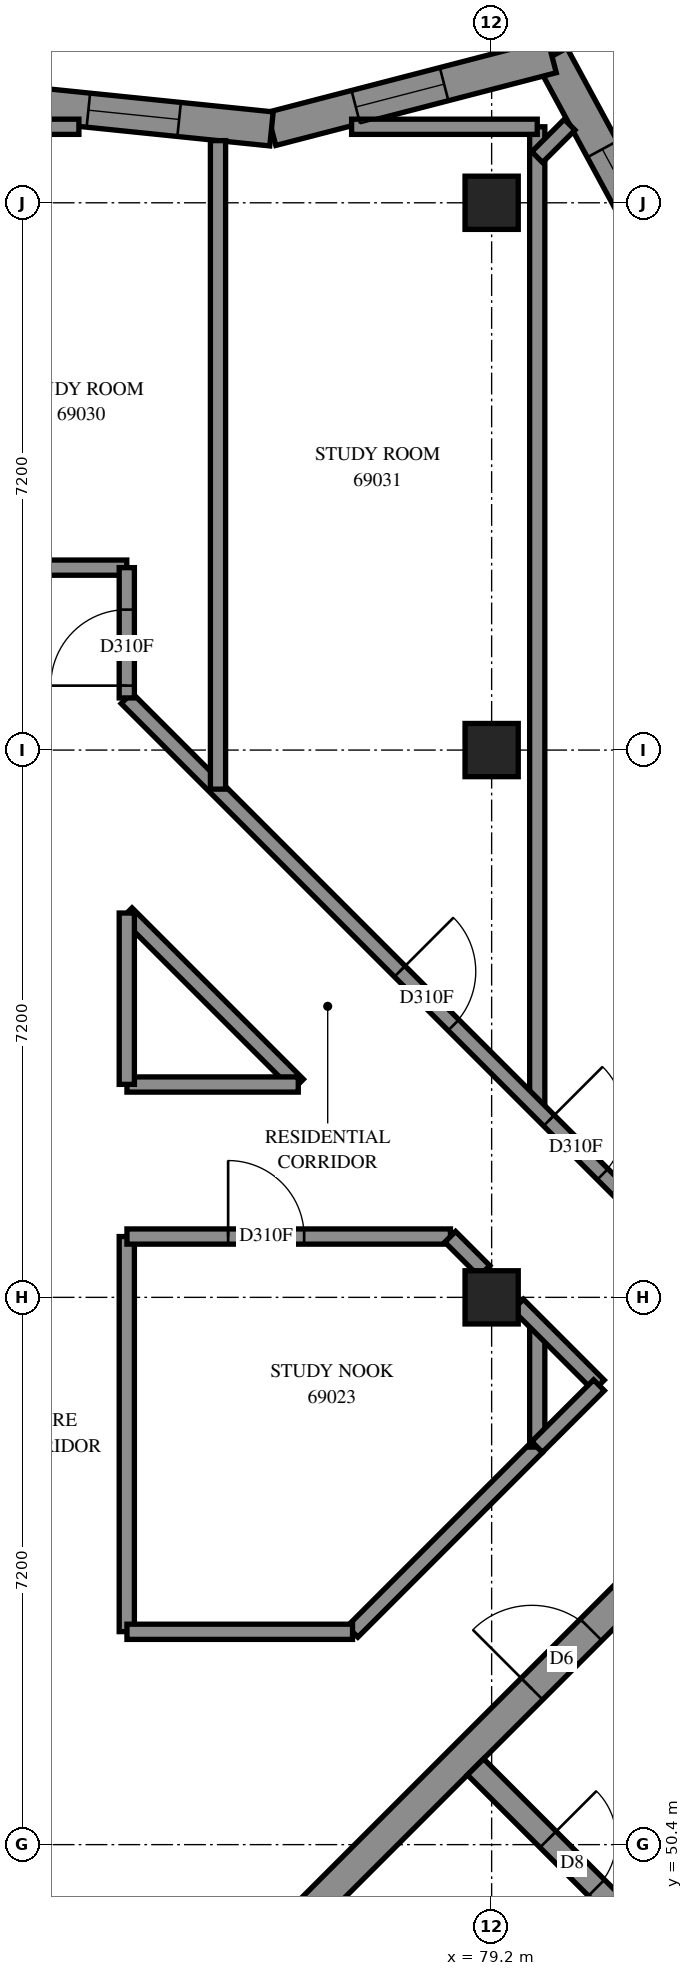
"""IFC4 building model, lengths in metres.
Left out: names, types, materials, properties, quantities, classifications, styles, units other than length and angle.
Written with IfcOpenShell. Run it as: python <this file> out.ifc"""

import sys

from ifc_helpers import new_model, si_unit, direction, frame, frame_2d, origin, origin_2d, place, context, subcontext, project, spatial, polyline, rectangle, outline, extrude, element, fill, save


model = new_model("IFC4")
c1 = context("Model", 3, precision=1e-05, world=origin(), true_north=direction((0.0, 1.0)))
c2 = subcontext(c1, "Body", "Model", "MODEL_VIEW")
j1 = project(units=[si_unit("LENGTHUNIT", "METRE"), si_unit("PLANEANGLEUNIT", "RADIAN")], contexts=[c1])
p1 = place(None, origin())
s1 = spatial("IfcSite", under=j1, at=p1, CompositionType="ELEMENT")
p2 = place(p1, origin())
s2 = spatial("IfcBuilding", under=s1, at=p2, CompositionType="ELEMENT")
p3 = place(p2, frame((0.0, 0.0, 254.0)))
s3 = spatial("IfcBuildingStorey", under=s2, at=p3, CompositionType="ELEMENT", Elevation=254.0)
for number, where, z_axis, x_axis in (
    (1, (79.2, 57.6, 0.0), (0.0, 0.0, 1.0), (1.0, 0.0, 0.0)),
    (2, (79.2, 64.8, 0.0), (0.0, 0.0, 1.0), (1.0, 0.0, 0.0)),
    (3, (79.2, 72.0, 0.0), (0.0, 0.0, 1.0), (1.0, 0.0, 0.0)),
):
    element("IfcColumn", number, at=place(p3, frame(where, z_axis=z_axis, x_axis=x_axis)), inside=s3, PredefinedType="COLUMN", context=c2, shape_type="SweptSolid", body=[
        extrude(rectangle(XDim=0.7, YDim=0.7, at=origin_2d()), origin(), (0.0, 0.0, 1.0), 3.1),
    ])
p4 = place(p3, frame((76.513, 49.231, -0.3), z_axis=(0.0, 0.0, 1.0), x_axis=(0.7071067812, 0.7071067812, 0.0)))
e4 = element("IfcWall", 4, at=p4, inside=s3, PredefinedType="SHEAR", context=c2, shape_type="SweptSolid", body=[
    extrude(rectangle(XDim=14.4, YDim=0.4, at=frame_2d((7.2, 0.0))), origin(), (0.0, 0.0, 1.0), 2.7),
])
p5 = place(p4, frame((4.55, 0.0, 0.3)))
e5 = element("IfcOpeningElement", 5, at=p5, cuts=e4, PredefinedType="OPENING", context=c2, shape_type="SweptSolid", body=[
    extrude(rectangle(XDim=1.1, YDim=2.1, at=frame_2d((0.55, 1.05))), frame((0.0, 0.21, 0.0), z_axis=(0.0, -1.0, 0.0), x_axis=(1.0, 0.0, 0.0)), (0.0, 0.0, 1.0), 0.42),
])
p6 = place(p4, frame((11.35, 0.0, 0.3)))
e6 = element("IfcOpeningElement", 6, at=p6, cuts=e4, PredefinedType="OPENING", context=c2, shape_type="SweptSolid", body=[
    extrude(rectangle(XDim=1.1, YDim=2.1, at=frame_2d((0.55, 1.05))), frame((0.0, 0.21, 0.0), z_axis=(0.0, -1.0, 0.0), x_axis=(1.0, 0.0, 0.0)), (0.0, 0.0, 1.0), 0.42),
])
p7 = place(p3, frame((78.988, 51.423, 0.0), z_axis=(0.0, 0.0, 1.0), x_axis=(0.7071067812, -0.7071067812, 0.0)))
e7 = element("IfcWall", 7, at=p7, inside=s3, PredefinedType="SOLIDWALL", context=c2, shape_type="SweptSolid", body=[
    extrude(rectangle(XDim=14.4, YDim=0.3, at=frame_2d((7.2, 0.0))), origin(), (0.0, 0.0, 1.0), 3.1),
])
p8 = place(p7, frame((1.35, 0.0, 0.0)))
e8 = element("IfcOpeningElement", 8, at=p8, cuts=e7, PredefinedType="OPENING", context=c2, shape_type="SweptSolid", body=[
    extrude(rectangle(XDim=0.9, YDim=2.1, at=frame_2d((0.45, 1.05))), frame((0.0, 0.16, 0.0), z_axis=(0.0, -1.0, 0.0), x_axis=(1.0, 0.0, 0.0)), (0.0, 0.0, 1.0), 0.32),
])
p9 = place(p7, frame((4.95, 0.0, 0.0)))
e9 = element("IfcOpeningElement", 9, at=p9, cuts=e7, PredefinedType="OPENING", context=c2, shape_type="SweptSolid", body=[
    extrude(rectangle(XDim=0.9, YDim=2.1, at=frame_2d((0.45, 1.05))), frame((0.0, 0.16, 0.0), z_axis=(0.0, -1.0, 0.0), x_axis=(1.0, 0.0, 0.0)), (0.0, 0.0, 1.0), 0.32),
])
p10 = place(p7, frame((8.55, 0.0, 0.0)))
e10 = element("IfcOpeningElement", 10, at=p10, cuts=e7, PredefinedType="OPENING", context=c2, shape_type="SweptSolid", body=[
    extrude(rectangle(XDim=0.9, YDim=2.1, at=frame_2d((0.45, 1.05))), frame((0.0, 0.16, 0.0), z_axis=(0.0, -1.0, 0.0), x_axis=(1.0, 0.0, 0.0)), (0.0, 0.0, 1.0), 0.32),
])
p11 = place(p7, frame((12.05, 0.0, 0.0)))
e11 = element("IfcOpeningElement", 11, at=p11, cuts=e7, PredefinedType="OPENING", context=c2, shape_type="SweptSolid", body=[
    extrude(rectangle(XDim=1.1, YDim=2.1, at=frame_2d((0.55, 1.05))), frame((0.0, 0.16, 0.0), z_axis=(0.0, -1.0, 0.0), x_axis=(1.0, 0.0, 0.0)), (0.0, 0.0, 1.0), 0.32),
])
p12 = place(p3, frame((81.586, 70.987, 0.0), z_axis=(0.0, 0.0, 1.0), x_axis=(-0.4760809047, 0.8794014852, 0.0)))
e12 = element("IfcWall", 12, at=p12, inside=s3, PredefinedType="SOLIDWALL", context=c2, shape_type="SweptSolid", body=[
    extrude(outline(polyline([(0.046, -0.225), (3.521, -0.225), (3.169, 0.225), (-0.046, 0.225), (0.046, -0.225)])), origin(), (0.0, 0.0, 1.0), 3.1),
])
p13 = place(p12, frame((0.754, 0.0, 0.45)))
e13 = element("IfcOpeningElement", 13, at=p13, cuts=e12, PredefinedType="OPENING", context=c2, shape_type="SweptSolid", body=[
    extrude(rectangle(XDim=1.2, YDim=2.55, at=frame_2d((0.6, 1.275))), frame((0.0, 0.235, 0.0), z_axis=(0.0, -1.0, 0.0), x_axis=(1.0, 0.0, 0.0)), (0.0, 0.0, 1.0), 0.47),
])
p14 = place(p3, frame((79.994, 73.929, 0.0), z_axis=(0.0, 0.0, 1.0), x_axis=(-0.9679820268, -0.2510195126, 0.0)))
e14 = element("IfcWall", 14, at=p14, inside=s3, PredefinedType="SOLIDWALL", context=c2, shape_type="SweptSolid", body=[
    extrude(outline(polyline([(-0.176, -0.225), (3.772, -0.225), (3.853, 0.225), (0.176, 0.225), (-0.176, -0.225)])), origin(), (0.0, 0.0, 1.0), 3.1),
])
p15 = place(p14, frame((1.466, 0.0, 0.45)))
e15 = element("IfcOpeningElement", 15, at=p15, cuts=e14, PredefinedType="OPENING", context=c2, shape_type="SweptSolid", body=[
    extrude(rectangle(XDim=1.2, YDim=2.55, at=frame_2d((0.6, 1.275))), frame((0.0, 0.235, 0.0), z_axis=(0.0, -1.0, 0.0), x_axis=(1.0, 0.0, 0.0)), (0.0, 0.0, 1.0), 0.47),
])
p16 = place(p3, frame((76.304, 72.972, 0.0), z_axis=(0.0, 0.0, 1.0), x_axis=(-0.994808045, 0.1017691196, 0.0)))
e16 = element("IfcWall", 16, at=p16, inside=s3, PredefinedType="SOLIDWALL", context=c2, shape_type="SweptSolid", body=[
    extrude(outline(polyline([(0.04, -0.225), (3.882, -0.225), (3.836, 0.225), (-0.04, 0.225), (0.04, -0.225)])), origin(), (0.0, 0.0, 1.0), 3.1),
])
p17 = place(p16, frame((1.222, 0.0, 0.45)))
e17 = element("IfcOpeningElement", 17, at=p17, cuts=e16, PredefinedType="OPENING", context=c2, shape_type="SweptSolid", body=[
    extrude(rectangle(XDim=1.2, YDim=2.55, at=frame_2d((0.6, 1.275))), frame((0.0, 0.235, 0.0), z_axis=(0.0, -1.0, 0.0), x_axis=(1.0, 0.0, 0.0)), (0.0, 0.0, 1.0), 0.47),
])
p18 = place(p3, frame((55.2, 67.2, 0.0), z_axis=(0.0, 0.0, 1.0), x_axis=(1.0, 0.0, 0.0)))
e18 = element("IfcWall", 18, at=p18, inside=s3, PredefinedType="PARTITIONING", context=c2, shape_type="SweptSolid", body=[
    extrude(rectangle(XDim=19.2, YDim=0.2, at=frame_2d((9.6, 0.0))), origin(), (0.0, 0.0, 1.0), 3.1),
])
p19 = place(p18, frame((4.475, 0.0, 0.0)))
e19 = element("IfcOpeningElement", 19, at=p19, cuts=e18, PredefinedType="OPENING", context=c2, shape_type="SweptSolid", body=[
    extrude(rectangle(XDim=1.0, YDim=2.1, at=frame_2d((0.5, 1.05))), frame((0.0, 0.11, 0.0), z_axis=(0.0, -1.0, 0.0), x_axis=(1.0, 0.0, 0.0)), (0.0, 0.0, 1.0), 0.22),
])
p20 = place(p18, frame((8.301, 0.0, 0.0)))
e20 = element("IfcOpeningElement", 20, at=p20, cuts=e18, PredefinedType="OPENING", context=c2, shape_type="SweptSolid", body=[
    extrude(rectangle(XDim=0.9, YDim=2.1, at=frame_2d((0.45, 1.05))), frame((0.0, 0.11, 0.0), z_axis=(0.0, -1.0, 0.0), x_axis=(1.0, 0.0, 0.0)), (0.0, 0.0, 1.0), 0.22),
])
p21 = place(p18, frame((13.88, 0.0, 0.0)))
e21 = element("IfcOpeningElement", 21, at=p21, cuts=e18, PredefinedType="OPENING", context=c2, shape_type="SweptSolid", body=[
    extrude(rectangle(XDim=1.0, YDim=2.1, at=frame_2d((0.5, 1.05))), frame((0.0, 0.11, 0.0), z_axis=(0.0, -1.0, 0.0), x_axis=(1.0, 0.0, 0.0)), (0.0, 0.0, 1.0), 0.22),
])
p22 = place(p3, frame((79.8, 60.086, 0.0), z_axis=(0.0, 0.0, 1.0), x_axis=(0.0, 1.0, 0.0)))
e22 = element("IfcWall", 22, at=p22, inside=s3, PredefinedType="PARTITIONING", context=c2, shape_type="SweptSolid", body=[
    extrude(rectangle(XDim=12.914, YDim=0.2, at=frame_2d((6.457, 0.0))), origin(), (0.0, 0.0, 1.0), 3.1),
])
p23 = place(p3, frame((74.397, 65.483, 0.0), z_axis=(0.0, 0.0, 1.0), x_axis=(0.7071067812, -0.7071067812, 0.0)))
e23 = element("IfcWall", 23, at=p23, inside=s3, PredefinedType="PARTITIONING", context=c2, shape_type="SweptSolid", body=[
    extrude(rectangle(XDim=10.788, YDim=0.2, at=frame_2d((5.394, 0.0))), origin(), (0.0, 0.0, 1.0), 3.1),
])
p24 = place(p23, frame((5.083, 0.0, 0.0)))
e24 = element("IfcOpeningElement", 24, at=p24, cuts=e23, PredefinedType="OPENING", context=c2, shape_type="SweptSolid", body=[
    extrude(rectangle(XDim=1.0, YDim=2.1, at=frame_2d((0.5, 1.05))), frame((0.0, 0.11, 0.0), z_axis=(0.0, -1.0, 0.0), x_axis=(1.0, 0.0, 0.0)), (0.0, 0.0, 1.0), 0.22),
])
p25 = place(p23, frame((7.858, 0.0, 0.0)))
e25 = element("IfcOpeningElement", 25, at=p25, cuts=e23, PredefinedType="OPENING", context=c2, shape_type="SweptSolid", body=[
    extrude(rectangle(XDim=1.0, YDim=2.1, at=frame_2d((0.5, 1.05))), frame((0.0, 0.11, 0.0), z_axis=(0.0, -1.0, 0.0), x_axis=(1.0, 0.0, 0.0)), (0.0, 0.0, 1.0), 0.22),
])
p26 = place(p3, frame((75.6, 64.286, 0.0), z_axis=(0.0, 0.0, 1.0), x_axis=(0.0, 1.0, 0.0)))
e26 = element("IfcWall", 26, at=p26, inside=s3, PredefinedType="PARTITIONING", context=c2, shape_type="SweptSolid", body=[
    extrude(rectangle(XDim=8.532, YDim=0.2, at=frame_2d((4.266, 0.0))), origin(), (0.0, 0.0, 1.0), 3.1),
])
p27 = place(p3, frame((74.4, 53.202, 0.0), z_axis=(0.0, 0.0, 1.0), x_axis=(0.0, 1.0, 0.0)))
e27 = element("IfcWall", 27, at=p27, inside=s3, PredefinedType="PARTITIONING", context=c2, shape_type="SweptSolid", body=[
    extrude(rectangle(XDim=5.198, YDim=0.2, at=frame_2d((2.599, 0.0))), origin(), (0.0, 0.0, 1.0), 3.1),
])
p28 = place(p3, frame((74.402, 58.4, 0.0), z_axis=(0.0, 0.0, 1.0), x_axis=(1.0, 0.0, 0.0)))
e28 = element("IfcWall", 28, at=p28, inside=s3, PredefinedType="PARTITIONING", context=c2, shape_type="SweptSolid", body=[
    extrude(rectangle(XDim=4.256, YDim=0.2, at=frame_2d((2.128, 0.0))), origin(), (0.0, 0.0, 1.0), 3.1),
])
p29 = place(p28, frame((1.331, 0.0, 0.0)))
e29 = element("IfcOpeningElement", 29, at=p29, cuts=e28, PredefinedType="OPENING", context=c2, shape_type="SweptSolid", body=[
    extrude(rectangle(XDim=1.0, YDim=2.1, at=frame_2d((0.5, 1.05))), frame((0.0, 0.11, 0.0), z_axis=(0.0, -1.0, 0.0), x_axis=(1.0, 0.0, 0.0)), (0.0, 0.0, 1.0), 0.22),
])
p30 = place(p3, frame((77.37, 53.2, 0.0), z_axis=(0.0, 0.0, 1.0), x_axis=(0.7071067812, 0.7071067812, 0.0)))
e30 = element("IfcWall", 30, at=p30, inside=s3, PredefinedType="PARTITIONING", context=c2, shape_type="SweptSolid", body=[
    extrude(rectangle(XDim=3.437, YDim=0.2, at=frame_2d((1.718, 0.0))), origin(), (0.0, 0.0, 1.0), 3.1),
])
p31 = place(p3, frame((74.399, 62.653, 0.0), z_axis=(0.0, 0.0, 1.0), x_axis=(0.7071067812, -0.7071067812, 0.0)))
e31 = element("IfcWall", 31, at=p31, inside=s3, PredefinedType="PARTITIONING", context=c2, shape_type="SweptSolid", body=[
    extrude(rectangle(XDim=3.188, YDim=0.2, at=frame_2d((1.594, 0.0))), origin(), (0.0, 0.0, 1.0), 3.1),
])
p32 = place(p3, frame((74.402, 53.2, 0.0), z_axis=(0.0, 0.0, 1.0), x_axis=(1.0, 0.0, 0.0)))
e32 = element("IfcWall", 32, at=p32, inside=s3, PredefinedType="PARTITIONING", context=c2, shape_type="SweptSolid", body=[
    extrude(rectangle(XDim=2.968, YDim=0.2, at=frame_2d((1.484, 0.0))), origin(), (0.0, 0.0, 1.0), 3.1),
])
p33 = place(p3, frame((71.16, 73.0, 0.0), z_axis=(0.0, 0.0, 1.0), x_axis=(1.0, 0.0, 0.0)))
e33 = element("IfcWall", 33, at=p33, inside=s3, PredefinedType="PARTITIONING", context=c2, shape_type="SweptSolid", body=[
    extrude(rectangle(XDim=2.61, YDim=0.2, at=frame_2d((1.305, 0.0))), origin(), (0.0, 0.0, 1.0), 3.1),
])
p34 = place(p3, frame((77.358, 73.0, 0.0), z_axis=(0.0, 0.0, 1.0), x_axis=(1.0, 0.0, 0.0)))
e34 = element("IfcWall", 34, at=p34, inside=s3, PredefinedType="PARTITIONING", context=c2, shape_type="SweptSolid", body=[
    extrude(rectangle(XDim=2.442, YDim=0.2, at=frame_2d((1.221, 0.0))), origin(), (0.0, 0.0, 1.0), 3.1),
])
for number, where, z_axis, x_axis in (
    (35, (74.402, 60.4, 0.0), (0.0, 0.0, 1.0), (1.0, 0.0, 0.0)),
    (36, (74.4, 60.402, 0.0), (0.0, 0.0, 1.0), (0.0, 1.0, 0.0)),
):
    element("IfcWall", number, at=place(p3, frame(where, z_axis=z_axis, x_axis=x_axis)), inside=s3, PredefinedType="PARTITIONING", context=c2, shape_type="SweptSolid", body=[
        extrude(rectangle(XDim=2.254, YDim=0.2, at=frame_2d((1.127, 0.0))), origin(), (0.0, 0.0, 1.0), 3.1),
    ])
p35 = place(p3, frame((74.4, 65.486, 0.0), z_axis=(0.0, 0.0, 1.0), x_axis=(0.0, 1.0, 0.0)))
e37 = element("IfcWall", 37, at=p35, inside=s3, PredefinedType="PARTITIONING", context=c2, shape_type="SweptSolid", body=[
    extrude(rectangle(XDim=1.714, YDim=0.2, at=frame_2d((0.857, 0.0))), origin(), (0.0, 0.0, 1.0), 3.1),
])
p36 = place(p35, frame((0.162, 0.0, 0.0)))
e38 = element("IfcOpeningElement", 38, at=p36, cuts=e37, PredefinedType="OPENING", context=c2, shape_type="SweptSolid", body=[
    extrude(rectangle(XDim=1.0, YDim=2.1, at=frame_2d((0.5, 1.05))), frame((0.0, 0.11, 0.0), z_axis=(0.0, -1.0, 0.0), x_axis=(1.0, 0.0, 0.0)), (0.0, 0.0, 1.0), 0.22),
])
p37 = place(p3, frame((79.8, 55.63, 0.0), z_axis=(0.0, 0.0, 1.0), x_axis=(0.0, 1.0, 0.0)))
e39 = element("IfcWall", 39, at=p37, inside=s3, PredefinedType="PARTITIONING", context=c2, shape_type="SweptSolid", body=[
    extrude(rectangle(XDim=1.628, YDim=0.2, at=frame_2d((0.814, 0.0))), origin(), (0.0, 0.0, 1.0), 3.1),
])
p38 = place(p3, frame((79.547, 57.505, 0.0), z_axis=(0.0, 0.0, 1.0), x_axis=(0.7071067812, -0.7071067812, 0.0)))
e40 = element("IfcWall", 40, at=p38, inside=s3, PredefinedType="PARTITIONING", context=c2, shape_type="SweptSolid", body=[
    extrude(rectangle(XDim=1.505, YDim=0.2, at=frame_2d((0.752, 0.0))), origin(), (0.0, 0.0, 1.0), 3.1),
])
p39 = place(p3, frame((79.798, 55.632, 0.0), z_axis=(0.0, 0.0, 1.0), x_axis=(0.7079759957, 0.7062364969, 0.0)))
e41 = element("IfcWall", 41, at=p39, inside=s3, PredefinedType="PARTITIONING", context=c2, shape_type="SweptSolid", body=[
    extrude(rectangle(XDim=1.15, YDim=0.2, at=frame_2d((0.575, 0.0))), origin(), (0.0, 0.0, 1.0), 3.1),
])
p40 = place(p3, frame((78.655, 58.397, 0.0), z_axis=(0.0, 0.0, 1.0), x_axis=(0.7071067812, -0.7071067812, 0.0)))
e42 = element("IfcWall", 42, at=p40, inside=s3, PredefinedType="PARTITIONING", context=c2, shape_type="SweptSolid", body=[
    extrude(rectangle(XDim=0.636, YDim=0.2, at=frame_2d((0.318, 0.0))), origin(), (0.0, 0.0, 1.0), 3.1),
])
p41 = place(p3, frame((79.799, 72.601, 0.0), z_axis=(0.0, 0.0, 1.0), x_axis=(0.707023909, 0.7071896436, 0.0)))
e43 = element("IfcWall", 43, at=p41, inside=s3, PredefinedType="PARTITIONING", context=c2, shape_type="SweptSolid", body=[
    extrude(rectangle(XDim=0.603, YDim=0.2, at=frame_2d((0.302, 0.0))), origin(), (0.0, 0.0, 1.0), 3.1),
])
p42 = place(p13, origin())
e44 = element("IfcWindow", 44, at=p42, inside=s3, PartitioningType="SINGLE_PANEL", PredefinedType="WINDOW", context=c2, shape_type="SweptSolid", body=[
    extrude(rectangle(XDim=1.2, YDim=2.55, at=frame_2d((0.6, 1.275))), frame((0.0, 0.205, 0.0), z_axis=(0.0, -1.0, 0.0), x_axis=(1.0, 0.0, 0.0)), (0.0, 0.0, 1.0), 0.06),
])
fill(e13, e44)
p43 = place(p15, origin())
e45 = element("IfcWindow", 45, at=p43, inside=s3, PartitioningType="SINGLE_PANEL", PredefinedType="WINDOW", context=c2, shape_type="SweptSolid", body=[
    extrude(rectangle(XDim=1.2, YDim=2.55, at=frame_2d((0.6, 1.275))), frame((0.0, 0.125, 0.0), z_axis=(0.0, -1.0, 0.0), x_axis=(1.0, 0.0, 0.0)), (0.0, 0.0, 1.0), 0.06),
])
fill(e15, e45)
p44 = place(p17, origin())
e46 = element("IfcWindow", 46, at=p44, inside=s3, PartitioningType="SINGLE_PANEL", PredefinedType="WINDOW", context=c2, shape_type="SweptSolid", body=[
    extrude(rectangle(XDim=1.2, YDim=2.55, at=frame_2d((0.6, 1.275))), frame((0.0, 0.205, 0.0), z_axis=(0.0, -1.0, 0.0), x_axis=(1.0, 0.0, 0.0)), (0.0, 0.0, 1.0), 0.06),
])
fill(e17, e46)
p45 = place(p5, origin())
e47 = element("IfcDoor", 47, at=p45, inside=s3, OperationType="DOUBLE_DOOR_SINGLE_SWING", PredefinedType="DOOR", context=c2, shape_type="SweptSolid", body=[
    extrude(rectangle(XDim=1.1, YDim=2.1, at=frame_2d((0.55, 1.05))), frame((0.0, 0.025, 0.0), z_axis=(0.0, -1.0, 0.0), x_axis=(1.0, 0.0, 0.0)), (0.0, 0.0, 1.0), 0.05),
])
fill(e5, e47)
p46 = place(p8, origin())
e48 = element("IfcDoor", 48, at=p46, inside=s3, OperationType="SINGLE_SWING_LEFT", PredefinedType="DOOR", context=c2, shape_type="SweptSolid", body=[
    extrude(rectangle(XDim=0.9, YDim=2.1, at=frame_2d((0.45, 1.05))), frame((0.0, 0.025, 0.0), z_axis=(0.0, -1.0, 0.0), x_axis=(1.0, 0.0, 0.0)), (0.0, 0.0, 1.0), 0.05),
])
fill(e8, e48)
p47 = place(p29, origin())
e49 = element("IfcDoor", 49, at=p47, inside=s3, OperationType="SINGLE_SWING_RIGHT", PredefinedType="DOOR", context=c2, shape_type="SweptSolid", body=[
    extrude(rectangle(XDim=1.0, YDim=2.1, at=frame_2d((0.5, 1.05))), frame((0.0, 0.025, 0.0), z_axis=(0.0, -1.0, 0.0), x_axis=(1.0, 0.0, 0.0)), (0.0, 0.0, 1.0), 0.05),
])
fill(e29, e49)
p48 = place(p36, origin())
e50 = element("IfcDoor", 50, at=p48, inside=s3, OperationType="SINGLE_SWING_RIGHT", PredefinedType="DOOR", context=c2, shape_type="SweptSolid", body=[
    extrude(rectangle(XDim=1.0, YDim=2.1, at=frame_2d((0.5, 1.05))), frame((0.0, 0.025, 0.0), z_axis=(0.0, -1.0, 0.0), x_axis=(1.0, 0.0, 0.0)), (0.0, 0.0, 1.0), 0.05),
])
fill(e38, e50)
p49 = place(p24, origin())
e51 = element("IfcDoor", 51, at=p49, inside=s3, OperationType="SINGLE_SWING_LEFT", PredefinedType="DOOR", context=c2, shape_type="SweptSolid", body=[
    extrude(rectangle(XDim=1.0, YDim=2.1, at=frame_2d((0.5, 1.05))), frame((0.0, 0.025, 0.0), z_axis=(0.0, -1.0, 0.0), x_axis=(1.0, 0.0, 0.0)), (0.0, 0.0, 1.0), 0.05),
])
fill(e24, e51)
p50 = place(p25, origin())
e52 = element("IfcDoor", 52, at=p50, inside=s3, OperationType="SINGLE_SWING_LEFT", PredefinedType="DOOR", context=c2, shape_type="SweptSolid", body=[
    extrude(rectangle(XDim=1.0, YDim=2.1, at=frame_2d((0.5, 1.05))), frame((0.0, 0.025, 0.0), z_axis=(0.0, -1.0, 0.0), x_axis=(1.0, 0.0, 0.0)), (0.0, 0.0, 1.0), 0.05),
])
fill(e25, e52)
save(model, sys.argv[1])
